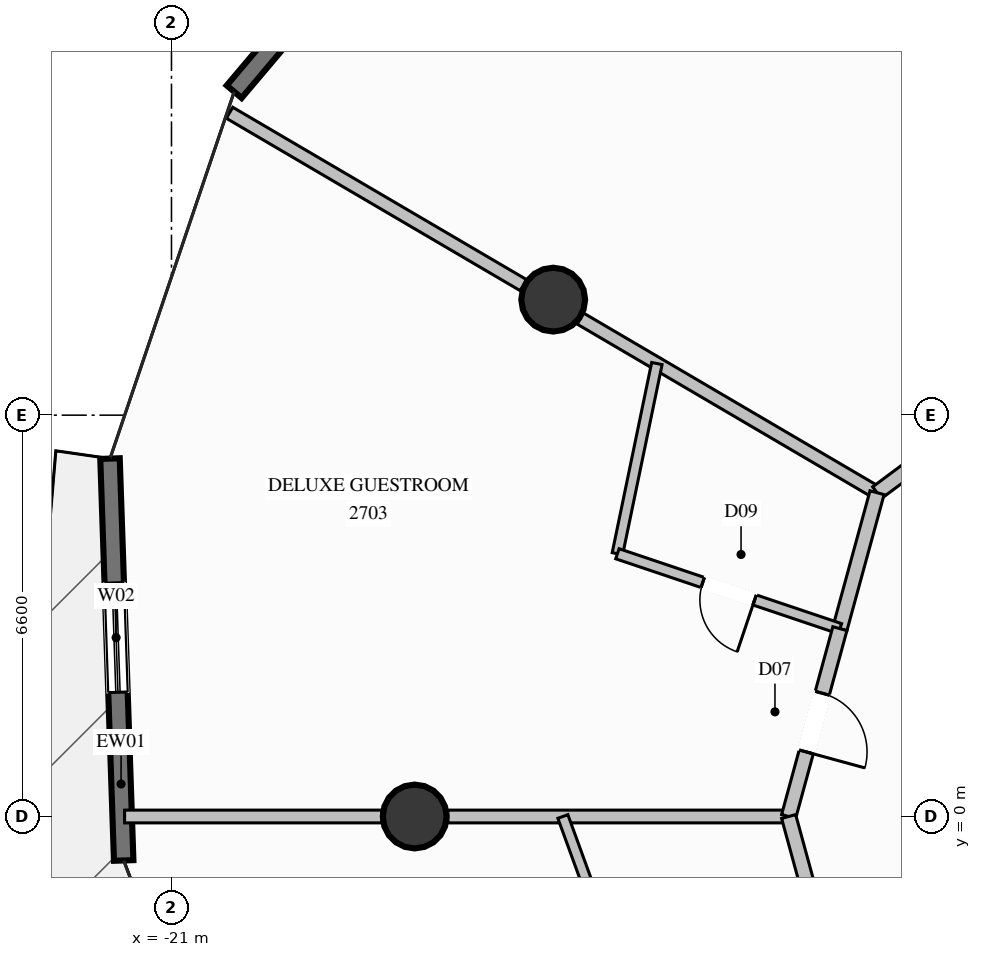
"""IFC4 building model, lengths in metres.
Left out: names, types, materials, properties, quantities, classifications, styles, units other than length and angle.
Written with IfcOpenShell. Run it as: python <this file> out.ifc"""

import sys

from ifc_helpers import new_model, si_unit, direction, frame, frame_2d, origin, origin_2d, place, context, subcontext, project, spatial, rectangle, circle, extrude, element, fill, save


model = new_model("IFC4")
c1 = context("Model", 3, precision=1e-05, world=origin(), true_north=direction((0.0, 1.0)))
c2 = subcontext(c1, "Body", "Model", "MODEL_VIEW")
j1 = project(units=[si_unit("LENGTHUNIT", "METRE"), si_unit("PLANEANGLEUNIT", "RADIAN")], contexts=[c1])
p1 = place(None, origin())
s1 = spatial("IfcSite", under=j1, at=p1, CompositionType="ELEMENT")
p2 = place(p1, origin())
s2 = spatial("IfcBuilding", under=s1, at=p2, CompositionType="ELEMENT")
p3 = place(p2, frame((0.0, 0.0, 102.6)))
s3 = spatial("IfcBuildingStorey", under=s2, at=p3, CompositionType="ELEMENT", Elevation=102.6)
for number, where, z_axis, x_axis in (
    (1, (-14.722, 8.5, 0.0), (0.0, 0.0, 1.0), (1.0, 0.0, 0.0)),
    (2, (-17.0, 0.0, 0.0), (0.0, 0.0, 1.0), (1.0, 0.0, 0.0)),
):
    element("IfcColumn", number, at=place(p3, frame(where, z_axis=z_axis, x_axis=x_axis)), inside=s3, PredefinedType="COLUMN", context=c2, shape_type="SweptSolid", body=[
        extrude(circle(Radius=0.525, at=origin_2d()), origin(), (0.0, 0.0, 1.0), 3.6),
    ])
p4 = place(p3, frame((-19.969, 11.919, 0.0), z_axis=(0.0, 0.0, 1.0), x_axis=(0.645278763483, 0.763947195425, 0.0)))
e3 = element("IfcWall", 3, at=p4, inside=s3, PredefinedType="SOLIDWALL", context=c2, shape_type="SweptSolid", body=[
    extrude(rectangle(XDim=6.369, YDim=0.32, at=frame_2d((3.185, 0.0))), origin(), (0.0, 0.0, 1.0), 3.35),
])
p5 = place(p4, frame((1.905, 0.0, 0.35)))
e4 = element("IfcOpeningElement", 4, at=p5, cuts=e3, PredefinedType="OPENING", context=c2, shape_type="SweptSolid", body=[
    extrude(rectangle(XDim=1.8, YDim=2.6, at=frame_2d((0.9, 1.3))), frame((0.0, 0.17, 0.0), z_axis=(0.0, -1.0, 0.0), x_axis=(1.0, 0.0, 0.0)), (0.0, 0.0, 1.0), 0.34),
])
p6 = place(p3, frame((-21.786, -0.723, 0.0), z_axis=(0.0, 0.0, 1.0), x_axis=(-0.034040106065, 0.999420467661, 0.0)))
e5 = element("IfcWall", 5, at=p6, inside=s3, PredefinedType="SOLIDWALL", context=c2, shape_type="SweptSolid", body=[
    extrude(rectangle(XDim=6.613, YDim=0.32, at=frame_2d((3.306, 0.0))), origin(), (0.0, 0.0, 1.0), 3.35),
])
p7 = place(p6, frame((2.767, 0.0, 0.35)))
e6 = element("IfcOpeningElement", 6, at=p7, cuts=e5, PredefinedType="OPENING", context=c2, shape_type="SweptSolid", body=[
    extrude(rectangle(XDim=1.8, YDim=2.6, at=frame_2d((0.9, 1.3))), frame((0.0, 0.17, 0.0), z_axis=(0.0, -1.0, 0.0), x_axis=(1.0, 0.0, 0.0)), (0.0, 0.0, 1.0), 0.34),
])
p8 = place(p3, frame((-9.396, 5.325, 0.0), z_axis=(0.0, 0.0, 1.0), x_axis=(-0.862467386777, 0.50611264235, 0.0)))
e7 = element("IfcWall", 7, at=p8, inside=s3, PredefinedType="PARTITIONING", context=c2, shape_type="SweptSolid", body=[
    extrude(rectangle(XDim=5.657, YDim=0.21, at=frame_2d((2.829, 0.0))), origin(), (0.0, 0.0, 1.0), 2.791),
])
p9 = place(p3, frame((-15.212, 8.738, 0.0), z_axis=(0.0, 0.0, 1.0), x_axis=(-0.862556345738, 0.505961016706, 0.0)))
e8 = element("IfcWall", 8, at=p9, inside=s3, PredefinedType="PARTITIONING", context=c2, shape_type="SweptSolid", body=[
    extrude(rectangle(XDim=5.603, YDim=0.21, at=frame_2d((2.802, 0.0))), origin(), (0.0, 0.0, 1.0), 3.35),
])
p10 = place(p3, frame((-10.85, 0.0, 0.0), z_axis=(0.0, 0.0, 1.0), x_axis=(-1.0, 0.0, 0.0)))
e9 = element("IfcWall", 9, at=p10, inside=s3, PredefinedType="PARTITIONING", context=c2, shape_type="SweptSolid", body=[
    extrude(rectangle(XDim=5.605, YDim=0.21, at=frame_2d((2.802, 0.0))), origin(), (0.0, 0.0, 1.0), 3.35),
])
p11 = place(p3, frame((-17.545, 0.0, 0.0), z_axis=(0.0, 0.0, 1.0), x_axis=(-1.0, 0.0, 0.0)))
e10 = element("IfcWall", 10, at=p11, inside=s3, PredefinedType="PARTITIONING", context=c2, shape_type="SweptSolid", body=[
    extrude(rectangle(XDim=4.226, YDim=0.21, at=frame_2d((2.113, 0.0))), origin(), (0.0, 0.0, 1.0), 3.35),
])
p12 = place(p3, frame((-9.396, 5.325, 0.0), z_axis=(0.0, 0.0, 1.0), x_axis=(0.8017416961, 0.597670689205, 0.0)))
e11 = element("IfcWall", 11, at=p12, inside=s3, PredefinedType="PARTITIONING", context=c2, shape_type="SweptSolid", body=[
    extrude(rectangle(XDim=2.552, YDim=0.24, at=frame_2d((1.276, 0.0))), origin(), (0.0, 0.0, 1.0), 3.35),
])
p13 = place(p12, frame((0.776, 0.0, 0.0)))
e12 = element("IfcOpeningElement", 12, at=p13, cuts=e11, PredefinedType="OPENING", context=c2, shape_type="SweptSolid", body=[
    extrude(rectangle(XDim=1.0, YDim=2.2, at=frame_2d((0.5, 1.1))), frame((0.0, 0.13, 0.0), z_axis=(0.0, -1.0, 0.0), x_axis=(1.0, 0.0, 0.0)), (0.0, 0.0, 1.0), 0.26),
])
p14 = place(p3, frame((-9.396, 5.325, 0.0), z_axis=(0.0, 0.0, 1.0), x_axis=(-0.263643210908, -0.964620265878, 0.0)))
e13 = element("IfcWall", 13, at=p14, inside=s3, PredefinedType="PARTITIONING", context=c2, shape_type="SweptSolid", body=[
    extrude(rectangle(XDim=2.318, YDim=0.24, at=frame_2d((1.159, 0.0))), origin(), (0.0, 0.0, 1.0), 3.35),
])
p15 = place(p3, frame((-13.017, 7.449, 0.0), z_axis=(0.0, 0.0, 1.0), x_axis=(-0.203136275653, -0.979150475419, 0.0)))
e14 = element("IfcWall", 14, at=p15, inside=s3, PredefinedType="PLUMBINGWALL", context=c2, shape_type="SweptSolid", body=[
    extrude(rectangle(XDim=3.195, YDim=0.175, at=frame_2d((1.597, 0.0))), origin(), (0.0, 0.0, 1.0), 3.35),
])
p16 = place(p3, frame((-10.007, 3.089, 0.0), z_axis=(0.0, 0.0, 1.0), x_axis=(-0.947724103288, 0.319090933822, 0.0)))
e15 = element("IfcWall", 15, at=p16, inside=s3, PredefinedType="PLUMBINGWALL", context=c2, shape_type="SweptSolid", body=[
    extrude(rectangle(XDim=3.861, YDim=0.175, at=frame_2d((1.93, 0.0))), origin(), (0.0, 0.0, 1.0), 3.35),
])
p17 = place(p16, frame((1.48, 0.0, 0.0)))
e16 = element("IfcOpeningElement", 16, at=p17, cuts=e15, PredefinedType="OPENING", context=c2, shape_type="SweptSolid", body=[
    extrude(rectangle(XDim=0.9, YDim=2.1, at=frame_2d((0.45, 1.05))), frame((0.0, 0.098, 0.0), z_axis=(0.0, -1.0, 0.0), x_axis=(1.0, 0.0, 0.0)), (0.0, 0.0, 1.0), 0.195),
])
p18 = place(p3, frame((-10.007, 3.089, 0.0), z_axis=(0.0, 0.0, 1.0), x_axis=(-0.263272237376, -0.964721581093, 0.0)))
e17 = element("IfcWall", 17, at=p18, inside=s3, PredefinedType="PARTITIONING", context=c2, shape_type="SweptSolid", body=[
    extrude(rectangle(XDim=3.202, YDim=0.24, at=frame_2d((1.601, 0.0))), origin(), (0.0, 0.0, 1.0), 3.35),
])
p19 = place(p18, frame((1.101, 0.0, 0.0)))
e18 = element("IfcOpeningElement", 18, at=p19, cuts=e17, PredefinedType="OPENING", context=c2, shape_type="SweptSolid", body=[
    extrude(rectangle(XDim=1.0, YDim=2.2, at=frame_2d((0.5, 1.1))), frame((0.0, 0.13, 0.0), z_axis=(0.0, -1.0, 0.0), x_axis=(1.0, 0.0, 0.0)), (0.0, 0.0, 1.0), 0.26),
])
p20 = place(p3, frame((-10.85, 0.0, 0.0), z_axis=(0.0, 0.0, 1.0), x_axis=(0.263616426241, -0.964627586074, 0.0)))
e19 = element("IfcWall", 19, at=p20, inside=s3, PredefinedType="PARTITIONING", context=c2, shape_type="SweptSolid", body=[
    extrude(rectangle(XDim=2.318, YDim=0.24, at=frame_2d((1.159, 0.0))), origin(), (0.0, 0.0, 1.0), 3.35),
])
p21 = place(p3, frame((-14.563, 0.0, 0.0), z_axis=(0.0, 0.0, 1.0), x_axis=(0.342092982083, -0.939666106449, 0.0)))
e20 = element("IfcWall", 20, at=p21, inside=s3, PredefinedType="PLUMBINGWALL", context=c2, shape_type="SweptSolid", body=[
    extrude(rectangle(XDim=3.081, YDim=0.175, at=frame_2d((1.541, 0.0))), origin(), (0.0, 0.0, 1.0), 3.35),
])
p22 = place(p7, origin())
e21 = element("IfcWindow", 21, at=p22, inside=s3, PartitioningType="SINGLE_PANEL", PredefinedType="WINDOW", context=c2, shape_type="SweptSolid", body=[
    extrude(rectangle(XDim=1.8, YDim=2.6, at=frame_2d((0.9, 1.3))), frame((0.0, 0.03, 0.0), z_axis=(0.0, -1.0, 0.0), x_axis=(1.0, 0.0, 0.0)), (0.0, 0.0, 1.0), 0.06),
])
fill(e6, e21)
p23 = place(p17, origin())
e22 = element("IfcDoor", 22, at=p23, inside=s3, OperationType="SINGLE_SWING_LEFT", PredefinedType="DOOR", context=c2, shape_type="SweptSolid", body=[
    extrude(rectangle(XDim=0.9, YDim=2.1, at=frame_2d((0.45, 1.05))), frame((0.0, 0.025, 0.0), z_axis=(0.0, -1.0, 0.0), x_axis=(1.0, 0.0, 0.0)), (0.0, 0.0, 1.0), 0.05),
])
fill(e16, e22)
p24 = place(p19, origin())
e23 = element("IfcDoor", 23, at=p24, inside=s3, OperationType="SINGLE_SWING_RIGHT", PredefinedType="DOOR", context=c2, shape_type="SweptSolid", body=[
    extrude(rectangle(XDim=1.0, YDim=2.2, at=frame_2d((0.5, 1.1))), frame((0.0, 0.025, 0.0), z_axis=(0.0, -1.0, 0.0), x_axis=(1.0, 0.0, 0.0)), (0.0, 0.0, 1.0), 0.05),
])
fill(e18, e23)
save(model, sys.argv[1])
